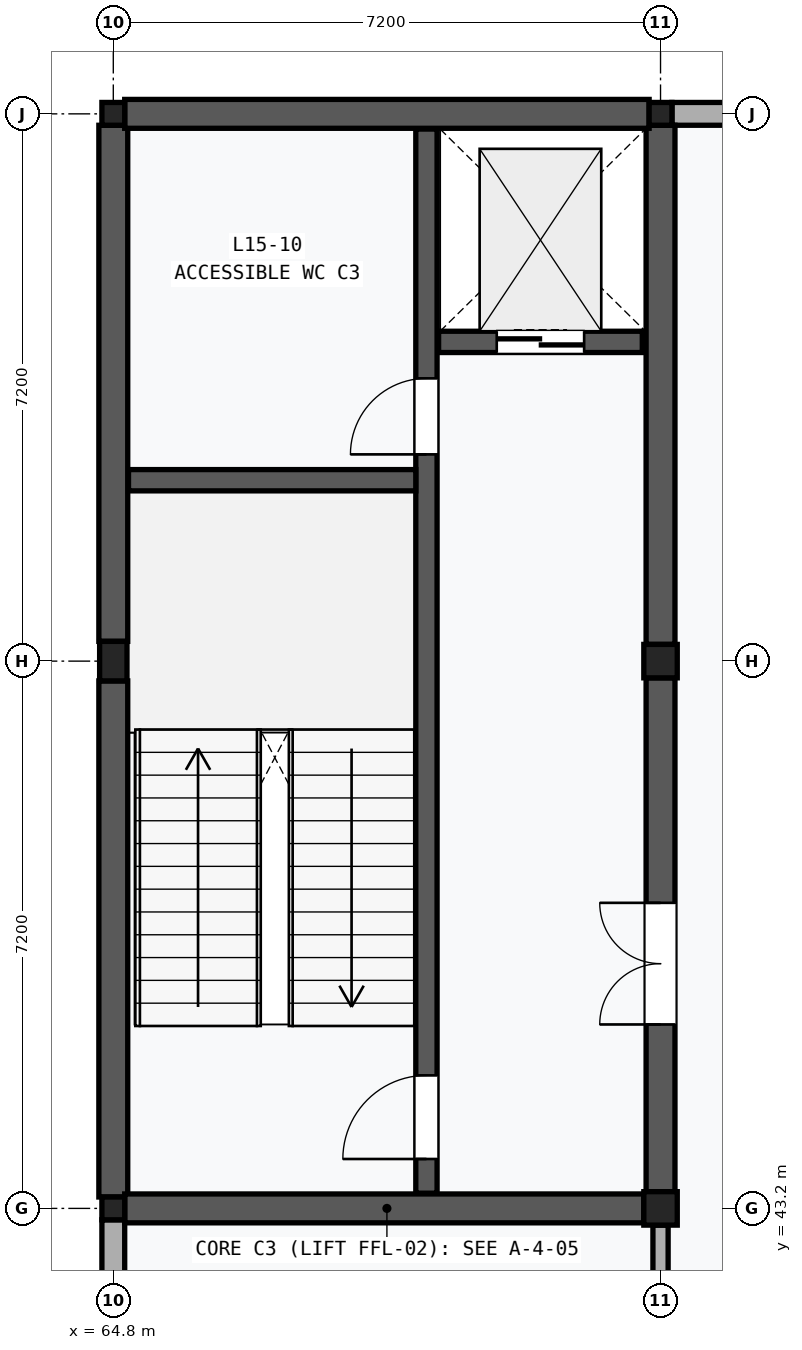
"""IFC4 building model, lengths in metres.
Left out: names, types, materials, properties, quantities, classifications, styles, units other than length and angle.
Written with IfcOpenShell. Run it as: python <this file> out.ifc"""

import sys

from ifc_helpers import new_model, si_unit, direction, frame, frame_2d, origin, origin_2d, place, context, subcontext, project, spatial, rectangle, extrude, element, fill, save


model = new_model("IFC4")
c1 = context("Model", 3, precision=1e-05, world=origin(), true_north=direction((0.0, 1.0)))
c2 = subcontext(c1, "Body", "Model", "MODEL_VIEW")
j1 = project(units=[si_unit("LENGTHUNIT", "METRE"), si_unit("PLANEANGLEUNIT", "RADIAN")], contexts=[c1])
p1 = place(None, origin())
s1 = spatial("IfcSite", under=j1, at=p1, CompositionType="ELEMENT")
p2 = place(p1, origin())
s2 = spatial("IfcBuilding", under=s1, at=p2, CompositionType="ELEMENT")
p3 = place(p2, frame((0.0, 0.0, 63.0)))
s3 = spatial("IfcBuildingStorey", under=s2, at=p3, CompositionType="ELEMENT", Elevation=63.0)
p4 = place(p3, frame((64.8, 43.2, 0.0), z_axis=(0.0, 0.0, 1.0), x_axis=(1.0, 0.0, 0.0)))
e1 = element("IfcColumn", 1, at=p4, inside=s3, PredefinedType="COLUMN", context=c2, shape_type="SweptSolid", body=[
    extrude(rectangle(XDim=0.3, YDim=0.3, at=origin_2d()), origin(), (0.0, 0.0, 1.0), 4.2),
])
p5 = place(p3, frame((64.8, 50.4, 0.0), z_axis=(0.0, 0.0, 1.0), x_axis=(1.0, 0.0, 0.0)))
e2 = element("IfcColumn", 2, at=p5, inside=s3, PredefinedType="PILASTER", context=c2, shape_type="SweptSolid", body=[
    extrude(rectangle(XDim=0.36, YDim=0.52, at=origin_2d()), origin(), (0.0, 0.0, 1.0), 4.2),
])
p6 = place(p3, frame((64.8, 57.6, 0.0), z_axis=(0.0, 0.0, 1.0), x_axis=(1.0, 0.0, 0.0)))
e3 = element("IfcColumn", 3, at=p6, inside=s3, PredefinedType="COLUMN", context=c2, shape_type="SweptSolid", body=[
    extrude(rectangle(XDim=0.3, YDim=0.3, at=origin_2d()), origin(), (0.0, 0.0, 1.0), 4.2),
])
for number, where, z_axis, x_axis in (
    (4, (72.0, 43.2, 0.0), (0.0, 0.0, 1.0), (1.0, 0.0, 0.0)),
    (5, (72.0, 50.4, 0.0), (0.0, 0.0, 1.0), (1.0, 0.0, 0.0)),
):
    element("IfcColumn", number, at=place(p3, frame(where, z_axis=z_axis, x_axis=x_axis)), inside=s3, PredefinedType="COLUMN", context=c2, shape_type="SweptSolid", body=[
        extrude(rectangle(XDim=0.44, YDim=0.44, at=origin_2d()), origin(), (0.0, 0.0, 1.0), 4.2),
    ])
p7 = place(p3, frame((72.0, 57.6, 0.0), z_axis=(0.0, 0.0, 1.0), x_axis=(1.0, 0.0, 0.0)))
e6 = element("IfcColumn", 6, at=p7, inside=s3, PredefinedType="COLUMN", context=c2, shape_type="SweptSolid", body=[
    extrude(rectangle(XDim=0.3, YDim=0.3, at=origin_2d()), origin(), (0.0, 0.0, 1.0), 4.2),
])
p8 = place(p3, frame((64.8, 36.15, 0.0), z_axis=(0.0, 0.0, 1.0), x_axis=(0.0, 1.0, 0.0)))
e7 = element("IfcWall", 7, at=p8, inside=s3, PredefinedType="SOLIDWALL", context=c2, shape_type="SweptSolid", body=[
    extrude(rectangle(XDim=6.9, YDim=0.3, at=frame_2d((3.45, 0.0))), origin(), (0.0, 0.0, 1.0), 3.39),
])
p9 = place(p3, frame((72.15, 57.6, 0.0), z_axis=(0.0, 0.0, 1.0), x_axis=(1.0, 0.0, 0.0)))
e8 = element("IfcWall", 8, at=p9, inside=s3, PredefinedType="SOLIDWALL", context=c2, shape_type="SweptSolid", body=[
    extrude(rectangle(XDim=6.9, YDim=0.3, at=frame_2d((3.45, 0.0))), origin(), (0.0, 0.0, 1.0), 3.39),
])
p10 = place(p9, frame((2.7, 0.0, 0.0)))
e9 = element("IfcOpeningElement", 9, at=p10, cuts=e8, PredefinedType="OPENING", context=c2, shape_type="SweptSolid", body=[
    extrude(rectangle(XDim=1.5, YDim=2.15, at=frame_2d((0.75, 1.075))), frame((0.0, 0.162, 0.0), z_axis=(0.0, -1.0, 0.0), x_axis=(1.0, 0.0, 0.0)), (0.0, 0.0, 1.0), 0.324),
])
p11 = place(p3, frame((64.8, 43.35, 0.0), z_axis=(0.0, 0.0, 1.0), x_axis=(0.0, 1.0, 0.0)))
e10 = element("IfcWall", 10, at=p11, inside=s3, PredefinedType="SHEAR", context=c2, shape_type="SweptSolid", body=[
    extrude(rectangle(XDim=6.79, YDim=0.38, at=frame_2d((3.395, 0.0))), origin(), (0.0, 0.0, 1.0), 3.39),
])
p12 = place(p3, frame((64.8, 50.66, 0.0), z_axis=(0.0, 0.0, 1.0), x_axis=(0.0, 1.0, 0.0)))
e11 = element("IfcWall", 11, at=p12, inside=s3, PredefinedType="SHEAR", context=c2, shape_type="SweptSolid", body=[
    extrude(rectangle(XDim=6.79, YDim=0.38, at=frame_2d((3.395, 0.0))), origin(), (0.0, 0.0, 1.0), 3.39),
])
p13 = place(p3, frame((72.0, 43.42, 0.0), z_axis=(0.0, 0.0, 1.0), x_axis=(0.0, 1.0, 0.0)))
e12 = element("IfcWall", 12, at=p13, inside=s3, PredefinedType="SHEAR", context=c2, shape_type="SweptSolid", body=[
    extrude(rectangle(XDim=6.76, YDim=0.38, at=frame_2d((3.38, 0.0))), origin(), (0.0, 0.0, 1.0), 3.31),
])
p14 = place(p13, frame((2.2, 0.0, 0.0)))
e13 = element("IfcOpeningElement", 13, at=p14, cuts=e12, PredefinedType="OPENING", context=c2, shape_type="SweptSolid", body=[
    extrude(rectangle(XDim=1.6, YDim=2.2, at=frame_2d((0.8, 1.1))), frame((0.0, 0.202, 0.0), z_axis=(0.0, -1.0, 0.0), x_axis=(1.0, 0.0, 0.0)), (0.0, 0.0, 1.0), 0.404),
])
p15 = place(p3, frame((72.0, 50.62, 0.0), z_axis=(0.0, 0.0, 1.0), x_axis=(0.0, 1.0, 0.0)))
e14 = element("IfcWall", 14, at=p15, inside=s3, PredefinedType="SHEAR", context=c2, shape_type="SweptSolid", body=[
    extrude(rectangle(XDim=6.83, YDim=0.38, at=frame_2d((3.415, 0.0))), origin(), (0.0, 0.0, 1.0), 3.31),
])
p16 = place(p3, frame((64.95, 43.2, 0.0), z_axis=(0.0, 0.0, 1.0), x_axis=(1.0, 0.0, 0.0)))
e15 = element("IfcWall", 15, at=p16, inside=s3, PredefinedType="SHEAR", context=c2, shape_type="SweptSolid", body=[
    extrude(rectangle(XDim=6.83, YDim=0.38, at=frame_2d((3.415, 0.0))), origin(), (0.0, 0.0, 1.0), 3.31),
])
p17 = place(p3, frame((64.95, 57.6, 0.0), z_axis=(0.0, 0.0, 1.0), x_axis=(1.0, 0.0, 0.0)))
e16 = element("IfcWall", 16, at=p17, inside=s3, PredefinedType="SHEAR", context=c2, shape_type="SweptSolid", body=[
    extrude(rectangle(XDim=6.9, YDim=0.38, at=frame_2d((3.45, 0.0))), origin(), (0.0, 0.0, 1.0), 3.39),
])
p18 = place(p3, frame((68.92, 43.4, 0.0), z_axis=(0.0, 0.0, 1.0), x_axis=(0.0, 1.0, 0.0)))
e17 = element("IfcWall", 17, at=p18, inside=s3, PredefinedType="SHEAR", context=c2, shape_type="SweptSolid", body=[
    extrude(rectangle(XDim=14.0, YDim=0.28, at=frame_2d((7.0, 0.0))), origin(), (0.0, 0.0, 1.0), 3.96),
])
p19 = place(p18, frame((0.45, 0.0, 0.0)))
e18 = element("IfcOpeningElement", 18, at=p19, cuts=e17, PredefinedType="OPENING", context=c2, shape_type="SweptSolid", body=[
    extrude(rectangle(XDim=1.1, YDim=2.15, at=frame_2d((0.55, 1.075))), frame((0.0, 0.152, 0.0), z_axis=(0.0, -1.0, 0.0), x_axis=(1.0, 0.0, 0.0)), (0.0, 0.0, 1.0), 0.304),
])
p20 = place(p18, frame((9.72, 0.0, 0.0)))
e19 = element("IfcOpeningElement", 19, at=p20, cuts=e17, PredefinedType="OPENING", context=c2, shape_type="SweptSolid", body=[
    extrude(rectangle(XDim=1.0, YDim=2.15, at=frame_2d((0.5, 1.075))), frame((0.0, 0.152, 0.0), z_axis=(0.0, -1.0, 0.0), x_axis=(1.0, 0.0, 0.0)), (0.0, 0.0, 1.0), 0.304),
])
p21 = place(p3, frame((65.0, 52.78, 0.0), z_axis=(0.0, 0.0, 1.0), x_axis=(1.0, 0.0, 0.0)))
e20 = element("IfcWall", 20, at=p21, inside=s3, PredefinedType="SHEAR", context=c2, shape_type="SweptSolid", body=[
    extrude(rectangle(XDim=3.78, YDim=0.28, at=frame_2d((1.89, 0.0))), origin(), (0.0, 0.0, 1.0), 3.96),
])
p22 = place(p3, frame((69.08, 54.6, 0.0), z_axis=(0.0, 0.0, 1.0), x_axis=(1.0, 0.0, 0.0)))
e21 = element("IfcWall", 21, at=p22, inside=s3, PredefinedType="SHEAR", context=c2, shape_type="SweptSolid", body=[
    extrude(rectangle(XDim=2.68, YDim=0.28, at=frame_2d((1.34, 0.0))), origin(), (0.0, 0.0, 1.0), 3.96),
])
p23 = place(p22, frame((0.765, 0.0, 0.0)))
e22 = element("IfcOpeningElement", 22, at=p23, cuts=e21, PredefinedType="OPENING", context=c2, shape_type="SweptSolid", body=[
    extrude(rectangle(XDim=1.15, YDim=2.2, at=frame_2d((0.575, 1.1))), frame((0.0, 0.152, 0.0), z_axis=(0.0, -1.0, 0.0), x_axis=(1.0, 0.0, 0.0)), (0.0, 0.0, 1.0), 0.304),
])
p24 = place(p3, frame((72.0, 36.22, 0.0), z_axis=(0.0, 0.0, 1.0), x_axis=(0.0, 1.0, 0.0)))
e23 = element("IfcWall", 23, at=p24, inside=s3, PredefinedType="PARTITIONING", context=c2, shape_type="SweptSolid", body=[
    extrude(rectangle(XDim=6.76, YDim=0.2, at=frame_2d((3.38, 0.0))), origin(), (0.0, 0.0, 1.0), 3.31),
])
p25 = place(p24, frame((2.74, 0.0, 0.0)))
e24 = element("IfcOpeningElement", 24, at=p25, cuts=e23, PredefinedType="OPENING", context=c2, shape_type="SweptSolid", body=[
    extrude(rectangle(XDim=1.28, YDim=2.28, at=frame_2d((0.64, 1.14))), frame((0.0, 0.112, 0.0), z_axis=(0.0, -1.0, 0.0), x_axis=(1.0, 0.0, 0.0)), (0.0, 0.0, 1.0), 0.224),
])
p26 = place(p14, origin())
e25 = element("IfcDoor", 25, at=p26, inside=s3, OperationType="DOUBLE_DOOR_SINGLE_SWING", PredefinedType="DOOR", context=c2, shape_type="SweptSolid", body=[
    extrude(rectangle(XDim=1.6, YDim=2.2, at=frame_2d((0.8, 1.1))), frame((0.0, 0.025, 0.0), z_axis=(0.0, -1.0, 0.0), x_axis=(1.0, 0.0, 0.0)), (0.0, 0.0, 1.0), 0.05),
])
fill(e13, e25)
p27 = place(p19, origin())
e26 = element("IfcDoor", 26, at=p27, inside=s3, OperationType="SINGLE_SWING_LEFT", PredefinedType="DOOR", context=c2, shape_type="SweptSolid", body=[
    extrude(rectangle(XDim=1.1, YDim=2.15, at=frame_2d((0.55, 1.075))), frame((0.0, 0.025, 0.0), z_axis=(0.0, -1.0, 0.0), x_axis=(1.0, 0.0, 0.0)), (0.0, 0.0, 1.0), 0.05),
])
fill(e18, e26)
p28 = place(p20, origin())
e27 = element("IfcDoor", 27, at=p28, inside=s3, OperationType="SINGLE_SWING_LEFT", PredefinedType="DOOR", context=c2, shape_type="SweptSolid", body=[
    extrude(rectangle(XDim=1.0, YDim=2.15, at=frame_2d((0.5, 1.075))), frame((0.0, 0.025, 0.0), z_axis=(0.0, -1.0, 0.0), x_axis=(1.0, 0.0, 0.0)), (0.0, 0.0, 1.0), 0.05),
])
fill(e19, e27)
p29 = place(p23, frame((1.15, 0.0, 0.0), z_axis=(0.0, 0.0, 1.0), x_axis=(-1.0, 0.0, 0.0)))
e28 = element("IfcDoor", 28, at=p29, inside=s3, OperationType="DOUBLE_DOOR_SLIDING", PredefinedType="DOOR", context=c2, shape_type="SweptSolid", body=[
    extrude(rectangle(XDim=1.15, YDim=2.2, at=frame_2d((0.575, 1.1))), frame((0.0, 0.025, 0.0), z_axis=(0.0, -1.0, 0.0), x_axis=(1.0, 0.0, 0.0)), (0.0, 0.0, 1.0), 0.05),
])
fill(e22, e28)
save(model, sys.argv[1])
